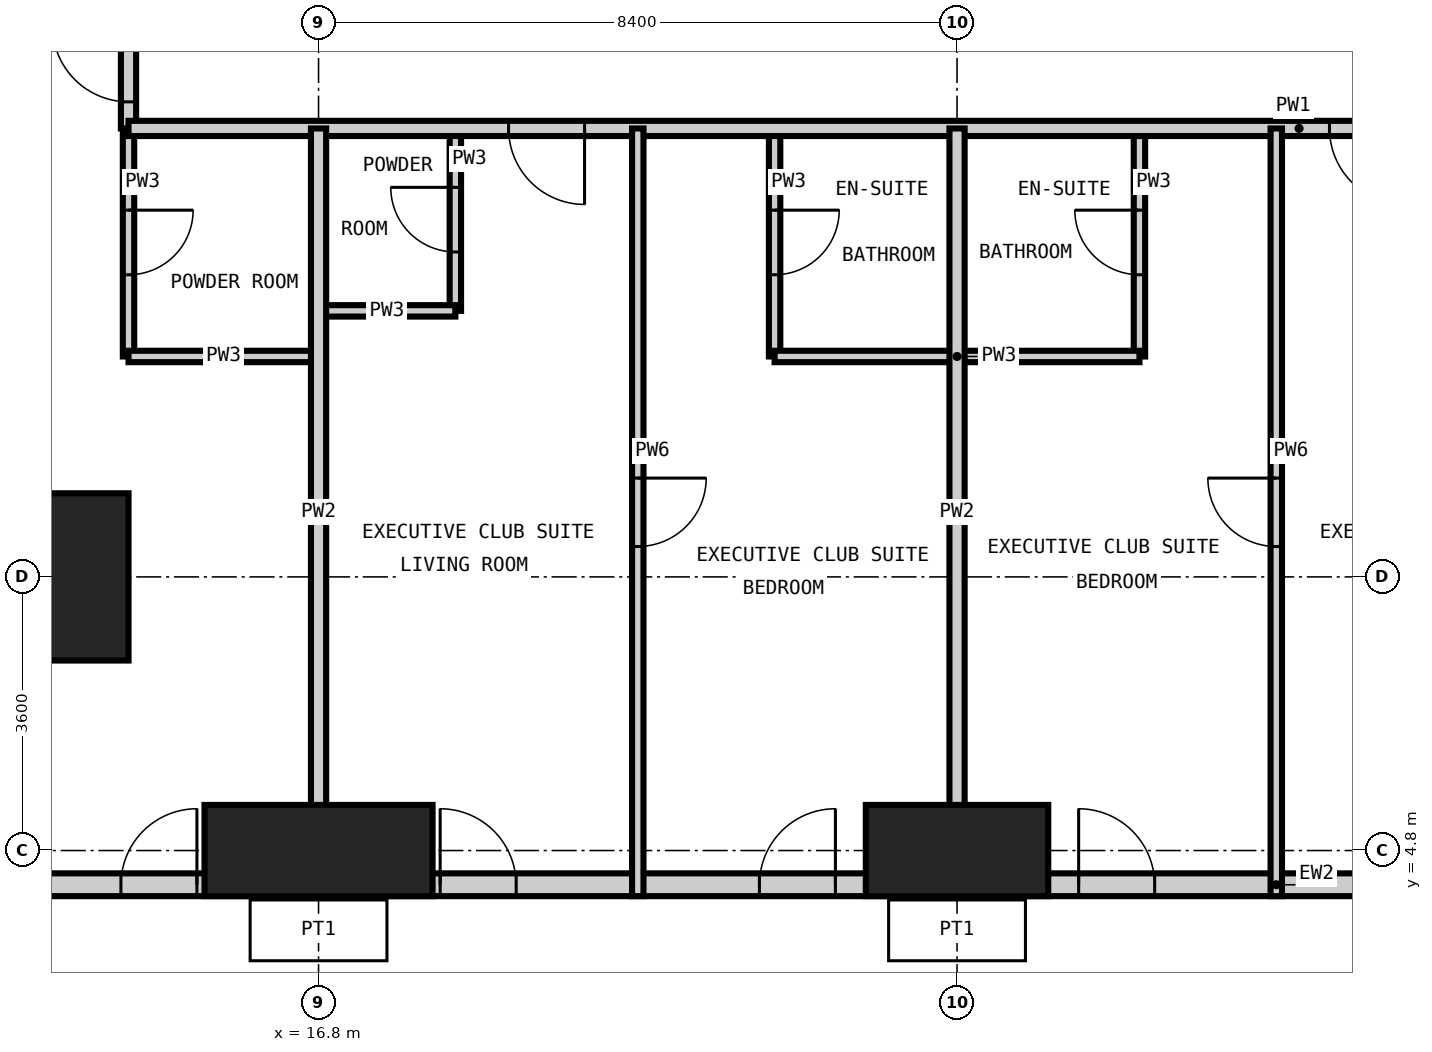
"""IFC4 building model, lengths in metres.
Left out: names, types, materials, properties, quantities, classifications, styles, units other than length and angle.
Written with IfcOpenShell. Run it as: python <this file> out.ifc"""

import sys

from ifc_helpers import new_model, si_unit, direction, frame, frame_2d, origin, origin_2d, place, context, subcontext, project, spatial, rectangle, extrude, element, fill, save


model = new_model("IFC4")
c1 = context("Model", 3, precision=1e-05, world=origin(), true_north=direction((0.0, 1.0)))
c2 = subcontext(c1, "Body", "Model", "MODEL_VIEW")
j1 = project(units=[si_unit("LENGTHUNIT", "METRE"), si_unit("PLANEANGLEUNIT", "RADIAN")], contexts=[c1])
p1 = place(None, origin())
s1 = spatial("IfcSite", under=j1, at=p1, CompositionType="ELEMENT")
p2 = place(p1, origin())
s2 = spatial("IfcBuilding", under=s1, at=p2, CompositionType="ELEMENT")
p3 = place(p2, frame((0.0, 0.0, 159.0)))
s3 = spatial("IfcBuildingStorey", under=s2, at=p3, CompositionType="ELEMENT", Elevation=159.0)
p4 = place(p3, frame((13.2, 8.4, -0.35), z_axis=(0.0, 0.0, 1.0), x_axis=(1.0, 0.0, 0.0)))
e1 = element("IfcColumn", 1, at=p4, inside=s3, PredefinedType="COLUMN", context=c2, shape_type="SweptSolid", body=[
    extrude(rectangle(XDim=2.2, YDim=2.2, at=origin_2d()), origin(), (0.0, 0.0, 1.0), 3.6),
])
p5 = place(p3, frame((16.8, 4.8, -0.35), z_axis=(0.0, 0.0, 1.0), x_axis=(1.0, 0.0, 0.0)))
e2 = element("IfcColumn", 2, at=p5, inside=s3, PredefinedType="COLUMN", context=c2, shape_type="SweptSolid", body=[
    extrude(rectangle(XDim=3.0, YDim=1.2, at=origin_2d()), origin(), (0.0, 0.0, 1.0), 3.6),
])
p6 = place(p3, frame((25.2, 4.8, -0.35), z_axis=(0.0, 0.0, 1.0), x_axis=(1.0, 0.0, 0.0)))
e3 = element("IfcColumn", 3, at=p6, inside=s3, PredefinedType="COLUMN", context=c2, shape_type="SweptSolid", body=[
    extrude(rectangle(XDim=2.4, YDim=1.2, at=origin_2d()), origin(), (0.0, 0.0, 1.0), 3.6),
])
p7 = place(p3, frame((6.9, 4.35, 0.0), z_axis=(0.0, 0.0, 1.0), x_axis=(1.0, 0.0, 0.0)))
e4 = element("IfcWall", 4, at=p7, inside=s3, PredefinedType="SOLIDWALL", context=c2, shape_type="SweptSolid", body=[
    extrude(rectangle(XDim=45.0, YDim=0.3, at=frame_2d((22.5, 0.0))), origin(), (0.0, 0.0, 1.0), 3.25),
])
p8 = place(p7, frame((2.75, 0.0, 0.0)))
e5 = element("IfcOpeningElement", 5, at=p8, cuts=e4, PredefinedType="OPENING", context=c2, shape_type="SweptSolid", body=[
    extrude(rectangle(XDim=1.0, YDim=2.4, at=frame_2d((0.5, 1.2))), frame((0.0, 0.16, 0.0), z_axis=(0.0, -1.0, 0.0), x_axis=(1.0, 0.0, 0.0)), (0.0, 0.0, 1.0), 0.32),
])
p9 = place(p7, frame((7.3, 0.0, 0.0)))
e6 = element("IfcOpeningElement", 6, at=p9, cuts=e4, PredefinedType="OPENING", context=c2, shape_type="SweptSolid", body=[
    extrude(rectangle(XDim=1.0, YDim=2.4, at=frame_2d((0.5, 1.2))), frame((0.0, 0.16, 0.0), z_axis=(0.0, -1.0, 0.0), x_axis=(1.0, 0.0, 0.0)), (0.0, 0.0, 1.0), 0.32),
])
p10 = place(p7, frame((11.5, 0.0, 0.0)))
e7 = element("IfcOpeningElement", 7, at=p10, cuts=e4, PredefinedType="OPENING", context=c2, shape_type="SweptSolid", body=[
    extrude(rectangle(XDim=1.0, YDim=2.4, at=frame_2d((0.5, 1.2))), frame((0.0, 0.16, 0.0), z_axis=(0.0, -1.0, 0.0), x_axis=(1.0, 0.0, 0.0)), (0.0, 0.0, 1.0), 0.32),
])
p11 = place(p7, frame((15.7, 0.0, 0.0)))
e8 = element("IfcOpeningElement", 8, at=p11, cuts=e4, PredefinedType="OPENING", context=c2, shape_type="SweptSolid", body=[
    extrude(rectangle(XDim=1.0, YDim=2.4, at=frame_2d((0.5, 1.2))), frame((0.0, 0.16, 0.0), z_axis=(0.0, -1.0, 0.0), x_axis=(1.0, 0.0, 0.0)), (0.0, 0.0, 1.0), 0.32),
])
p12 = place(p7, frame((19.9, 0.0, 0.0)))
e9 = element("IfcOpeningElement", 9, at=p12, cuts=e4, PredefinedType="OPENING", context=c2, shape_type="SweptSolid", body=[
    extrude(rectangle(XDim=1.0, YDim=2.4, at=frame_2d((0.5, 1.2))), frame((0.0, 0.16, 0.0), z_axis=(0.0, -1.0, 0.0), x_axis=(1.0, 0.0, 0.0)), (0.0, 0.0, 1.0), 0.32),
])
p13 = place(p7, frame((24.1, 0.0, 0.0)))
e10 = element("IfcOpeningElement", 10, at=p13, cuts=e4, PredefinedType="OPENING", context=c2, shape_type="SweptSolid", body=[
    extrude(rectangle(XDim=1.0, YDim=2.4, at=frame_2d((0.5, 1.2))), frame((0.0, 0.16, 0.0), z_axis=(0.0, -1.0, 0.0), x_axis=(1.0, 0.0, 0.0)), (0.0, 0.0, 1.0), 0.32),
])
p14 = place(p7, frame((28.3, 0.0, 0.0)))
e11 = element("IfcOpeningElement", 11, at=p14, cuts=e4, PredefinedType="OPENING", context=c2, shape_type="SweptSolid", body=[
    extrude(rectangle(XDim=1.0, YDim=2.4, at=frame_2d((0.5, 1.2))), frame((0.0, 0.16, 0.0), z_axis=(0.0, -1.0, 0.0), x_axis=(1.0, 0.0, 0.0)), (0.0, 0.0, 1.0), 0.32),
])
p15 = place(p7, frame((32.5, 0.0, 0.0)))
e12 = element("IfcOpeningElement", 12, at=p15, cuts=e4, PredefinedType="OPENING", context=c2, shape_type="SweptSolid", body=[
    extrude(rectangle(XDim=1.0, YDim=2.4, at=frame_2d((0.5, 1.2))), frame((0.0, 0.16, 0.0), z_axis=(0.0, -1.0, 0.0), x_axis=(1.0, 0.0, 0.0)), (0.0, 0.0, 1.0), 0.32),
])
p16 = place(p7, frame((36.7, 0.0, 0.0)))
e13 = element("IfcOpeningElement", 13, at=p16, cuts=e4, PredefinedType="OPENING", context=c2, shape_type="SweptSolid", body=[
    extrude(rectangle(XDim=1.0, YDim=2.4, at=frame_2d((0.5, 1.2))), frame((0.0, 0.16, 0.0), z_axis=(0.0, -1.0, 0.0), x_axis=(1.0, 0.0, 0.0)), (0.0, 0.0, 1.0), 0.32),
])
p17 = place(p7, frame((41.25, 0.0, 0.0)))
e14 = element("IfcOpeningElement", 14, at=p17, cuts=e4, PredefinedType="OPENING", context=c2, shape_type="SweptSolid", body=[
    extrude(rectangle(XDim=1.0, YDim=2.4, at=frame_2d((0.5, 1.2))), frame((0.0, 0.16, 0.0), z_axis=(0.0, -1.0, 0.0), x_axis=(1.0, 0.0, 0.0)), (0.0, 0.0, 1.0), 0.32),
])
p18 = place(p3, frame((14.3, 11.3, 0.0), z_axis=(0.0, 0.0, 1.0), x_axis=(0.0, 1.0, 0.0)))
e15 = element("IfcWall", 15, at=p18, inside=s3, PredefinedType="PARTITIONING", context=c2, shape_type="SweptSolid", body=[
    extrude(rectangle(XDim=3.0, YDim=0.15, at=frame_2d((1.5, 0.0))), origin(), (0.0, 0.0, 1.0), 3.25),
])
p19 = place(p18, frame((1.075, 0.0, 0.0)))
e16 = element("IfcOpeningElement", 16, at=p19, cuts=e15, PredefinedType="OPENING", context=c2, shape_type="SweptSolid", body=[
    extrude(rectangle(XDim=0.85, YDim=2.1, at=frame_2d((0.425, 1.05))), frame((0.0, 0.085, 0.0), z_axis=(0.0, -1.0, 0.0), x_axis=(1.0, 0.0, 0.0)), (0.0, 0.0, 1.0), 0.17),
])
p20 = place(p3, frame((18.6, 11.9, 0.0), z_axis=(0.0, 0.0, 1.0), x_axis=(0.0, 1.0, 0.0)))
e17 = element("IfcWall", 17, at=p20, inside=s3, PredefinedType="PARTITIONING", context=c2, shape_type="SweptSolid", body=[
    extrude(rectangle(XDim=2.4, YDim=0.15, at=frame_2d((1.2, 0.0))), origin(), (0.0, 0.0, 1.0), 3.25),
])
p21 = place(p20, frame((0.775, 0.0, 0.0)))
e18 = element("IfcOpeningElement", 18, at=p21, cuts=e17, PredefinedType="OPENING", context=c2, shape_type="SweptSolid", body=[
    extrude(rectangle(XDim=0.85, YDim=2.1, at=frame_2d((0.425, 1.05))), frame((0.0, 0.085, 0.0), z_axis=(0.0, -1.0, 0.0), x_axis=(1.0, 0.0, 0.0)), (0.0, 0.0, 1.0), 0.17),
])
p22 = place(p3, frame((22.8, 11.3, 0.0), z_axis=(0.0, 0.0, 1.0), x_axis=(0.0, 1.0, 0.0)))
e19 = element("IfcWall", 19, at=p22, inside=s3, PredefinedType="PARTITIONING", context=c2, shape_type="SweptSolid", body=[
    extrude(rectangle(XDim=3.0, YDim=0.15, at=frame_2d((1.5, 0.0))), origin(), (0.0, 0.0, 1.0), 3.25),
])
p23 = place(p22, frame((1.075, 0.0, 0.0)))
e20 = element("IfcOpeningElement", 20, at=p23, cuts=e19, PredefinedType="OPENING", context=c2, shape_type="SweptSolid", body=[
    extrude(rectangle(XDim=0.85, YDim=2.1, at=frame_2d((0.425, 1.05))), frame((0.0, 0.085, 0.0), z_axis=(0.0, -1.0, 0.0), x_axis=(1.0, 0.0, 0.0)), (0.0, 0.0, 1.0), 0.17),
])
p24 = place(p3, frame((27.6, 11.3, 0.0), z_axis=(0.0, 0.0, 1.0), x_axis=(0.0, 1.0, 0.0)))
e21 = element("IfcWall", 21, at=p24, inside=s3, PredefinedType="PARTITIONING", context=c2, shape_type="SweptSolid", body=[
    extrude(rectangle(XDim=3.0, YDim=0.15, at=frame_2d((1.5, 0.0))), origin(), (0.0, 0.0, 1.0), 3.25),
])
p25 = place(p24, frame((1.075, 0.0, 0.0)))
e22 = element("IfcOpeningElement", 22, at=p25, cuts=e21, PredefinedType="OPENING", context=c2, shape_type="SweptSolid", body=[
    extrude(rectangle(XDim=0.85, YDim=2.1, at=frame_2d((0.425, 1.05))), frame((0.0, 0.085, 0.0), z_axis=(0.0, -1.0, 0.0), x_axis=(1.0, 0.0, 0.0)), (0.0, 0.0, 1.0), 0.17),
])
p26 = place(p3, frame((14.3, 11.3, 0.0), z_axis=(0.0, 0.0, 1.0), x_axis=(1.0, 0.0, 0.0)))
e23 = element("IfcWall", 23, at=p26, inside=s3, PredefinedType="PARTITIONING", context=c2, shape_type="SweptSolid", body=[
    extrude(rectangle(XDim=2.5, YDim=0.15, at=frame_2d((1.25, 0.0))), origin(), (0.0, 0.0, 1.0), 3.25),
])
p27 = place(p3, frame((22.8, 11.3, 0.0), z_axis=(0.0, 0.0, 1.0), x_axis=(1.0, 0.0, 0.0)))
e24 = element("IfcWall", 24, at=p27, inside=s3, PredefinedType="PARTITIONING", context=c2, shape_type="SweptSolid", body=[
    extrude(rectangle(XDim=4.8, YDim=0.15, at=frame_2d((2.4, 0.0))), origin(), (0.0, 0.0, 1.0), 3.25),
])
p28 = place(p3, frame((16.8, 11.9, 0.0), z_axis=(0.0, 0.0, 1.0), x_axis=(1.0, 0.0, 0.0)))
e25 = element("IfcWall", 25, at=p28, inside=s3, PredefinedType="PARTITIONING", context=c2, shape_type="SweptSolid", body=[
    extrude(rectangle(XDim=1.8, YDim=0.15, at=frame_2d((0.9, 0.0))), origin(), (0.0, 0.0, 1.0), 3.25),
])
p29 = place(p3, frame((14.3, 14.3, 0.0), z_axis=(0.0, 0.0, 1.0), x_axis=(0.0, 1.0, 0.0)))
e26 = element("IfcWall", 26, at=p29, inside=s3, PredefinedType="PARTITIONING", context=c2, shape_type="SweptSolid", body=[
    extrude(rectangle(XDim=31.4, YDim=0.2, at=frame_2d((15.7, 0.0))), origin(), (0.0, 0.0, 1.0), 3.25),
])
p30 = place(p29, frame((8.3, 0.0, 0.0)))
e27 = element("IfcOpeningElement", 27, at=p30, cuts=e26, PredefinedType="OPENING", context=c2, shape_type="SweptSolid", body=[
    extrude(rectangle(XDim=1.0, YDim=2.2, at=frame_2d((0.5, 1.1))), frame((0.0, 0.11, 0.0), z_axis=(0.0, -1.0, 0.0), x_axis=(1.0, 0.0, 0.0)), (0.0, 0.0, 1.0), 0.22),
])
p31 = place(p29, frame((20.9, 0.0, 0.0)))
e28 = element("IfcOpeningElement", 28, at=p31, cuts=e26, PredefinedType="OPENING", context=c2, shape_type="SweptSolid", body=[
    extrude(rectangle(XDim=1.0, YDim=2.2, at=frame_2d((0.5, 1.1))), frame((0.0, 0.11, 0.0), z_axis=(0.0, -1.0, 0.0), x_axis=(1.0, 0.0, 0.0)), (0.0, 0.0, 1.0), 0.22),
])
p32 = place(p29, frame((0.35, 0.0, 0.0)))
e29 = element("IfcOpeningElement", 29, at=p32, cuts=e26, PredefinedType="OPENING", context=c2, shape_type="SweptSolid", body=[
    extrude(rectangle(XDim=1.0, YDim=2.2, at=frame_2d((0.5, 1.1))), frame((0.0, 0.11, 0.0), z_axis=(0.0, -1.0, 0.0), x_axis=(1.0, 0.0, 0.0)), (0.0, 0.0, 1.0), 0.22),
])
p33 = place(p29, frame((29.05, 0.0, 0.0)))
e30 = element("IfcOpeningElement", 30, at=p33, cuts=e26, PredefinedType="OPENING", context=c2, shape_type="SweptSolid", body=[
    extrude(rectangle(XDim=1.0, YDim=2.2, at=frame_2d((0.5, 1.1))), frame((0.0, 0.11, 0.0), z_axis=(0.0, -1.0, 0.0), x_axis=(1.0, 0.0, 0.0)), (0.0, 0.0, 1.0), 0.22),
])
p34 = place(p3, frame((45.1, 14.3, 0.0), z_axis=(0.0, 0.0, 1.0), x_axis=(-1.0, 0.0, 0.0)))
e31 = element("IfcWall", 31, at=p34, inside=s3, PredefinedType="PARTITIONING", context=c2, shape_type="SweptSolid", body=[
    extrude(rectangle(XDim=30.8, YDim=0.2, at=frame_2d((15.4, 0.0))), origin(), (0.0, 0.0, 1.0), 3.25),
])
p35 = place(p34, frame((24.8, 0.0, 0.0)))
e32 = element("IfcOpeningElement", 32, at=p35, cuts=e31, PredefinedType="OPENING", context=c2, shape_type="SweptSolid", body=[
    extrude(rectangle(XDim=1.0, YDim=2.2, at=frame_2d((0.5, 1.1))), frame((0.0, 0.11, 0.0), z_axis=(0.0, -1.0, 0.0), x_axis=(1.0, 0.0, 0.0)), (0.0, 0.0, 1.0), 0.22),
])
p36 = place(p34, frame((14.0, 0.0, 0.0)))
e33 = element("IfcOpeningElement", 33, at=p36, cuts=e31, PredefinedType="OPENING", context=c2, shape_type="SweptSolid", body=[
    extrude(rectangle(XDim=1.0, YDim=2.2, at=frame_2d((0.5, 1.1))), frame((0.0, 0.11, 0.0), z_axis=(0.0, -1.0, 0.0), x_axis=(1.0, 0.0, 0.0)), (0.0, 0.0, 1.0), 0.22),
])
p37 = place(p34, frame((8.0, 0.0, 0.0)))
e34 = element("IfcOpeningElement", 34, at=p37, cuts=e31, PredefinedType="OPENING", context=c2, shape_type="SweptSolid", body=[
    extrude(rectangle(XDim=1.0, YDim=2.2, at=frame_2d((0.5, 1.1))), frame((0.0, 0.11, 0.0), z_axis=(0.0, -1.0, 0.0), x_axis=(1.0, 0.0, 0.0)), (0.0, 0.0, 1.0), 0.22),
])
for number, where, z_axis, x_axis in (
    (35, (16.8, 4.2, 0.0), (0.0, 0.0, 1.0), (0.0, 1.0, 0.0)),
    (36, (25.2, 4.2, 0.0), (0.0, 0.0, 1.0), (0.0, 1.0, 0.0)),
):
    element("IfcWall", number, at=place(p3, frame(where, z_axis=z_axis, x_axis=x_axis)), inside=s3, PredefinedType="PARTITIONING", context=c2, shape_type="SweptSolid", body=[
        extrude(rectangle(XDim=10.1, YDim=0.2, at=frame_2d((5.05, 0.0))), origin(), (0.0, 0.0, 1.0), 3.25),
    ])
p38 = place(p3, frame((21.0, 4.2, 0.0), z_axis=(0.0, 0.0, 1.0), x_axis=(0.0, 1.0, 0.0)))
e37 = element("IfcWall", 37, at=p38, inside=s3, PredefinedType="PARTITIONING", context=c2, shape_type="SweptSolid", body=[
    extrude(rectangle(XDim=10.1, YDim=0.15, at=frame_2d((5.05, 0.0))), origin(), (0.0, 0.0, 1.0), 3.25),
])
p39 = place(p38, frame((4.6, 0.0, 0.0)))
e38 = element("IfcOpeningElement", 38, at=p39, cuts=e37, PredefinedType="OPENING", context=c2, shape_type="SweptSolid", body=[
    extrude(rectangle(XDim=0.9, YDim=2.1, at=frame_2d((0.45, 1.05))), frame((0.0, 0.085, 0.0), z_axis=(0.0, -1.0, 0.0), x_axis=(1.0, 0.0, 0.0)), (0.0, 0.0, 1.0), 0.17),
])
p40 = place(p3, frame((29.4, 4.2, 0.0), z_axis=(0.0, 0.0, 1.0), x_axis=(0.0, 1.0, 0.0)))
e39 = element("IfcWall", 39, at=p40, inside=s3, PredefinedType="PARTITIONING", context=c2, shape_type="SweptSolid", body=[
    extrude(rectangle(XDim=10.1, YDim=0.15, at=frame_2d((5.05, 0.0))), origin(), (0.0, 0.0, 1.0), 3.25),
])
p41 = place(p40, frame((4.6, 0.0, 0.0)))
e40 = element("IfcOpeningElement", 40, at=p41, cuts=e39, PredefinedType="OPENING", context=c2, shape_type="SweptSolid", body=[
    extrude(rectangle(XDim=0.9, YDim=2.1, at=frame_2d((0.45, 1.05))), frame((0.0, 0.085, 0.0), z_axis=(0.0, -1.0, 0.0), x_axis=(1.0, 0.0, 0.0)), (0.0, 0.0, 1.0), 0.17),
])
p42 = place(p9, origin())
e41 = element("IfcDoor", 41, at=p42, inside=s3, OperationType="SINGLE_SWING_RIGHT", PredefinedType="DOOR", context=c2, shape_type="SweptSolid", body=[
    extrude(rectangle(XDim=1.0, YDim=2.4, at=frame_2d((0.5, 1.2))), frame((0.0, 0.025, 0.0), z_axis=(0.0, -1.0, 0.0), x_axis=(1.0, 0.0, 0.0)), (0.0, 0.0, 1.0), 0.05),
])
fill(e6, e41)
p43 = place(p10, origin())
e42 = element("IfcDoor", 42, at=p43, inside=s3, OperationType="SINGLE_SWING_LEFT", PredefinedType="DOOR", context=c2, shape_type="SweptSolid", body=[
    extrude(rectangle(XDim=1.0, YDim=2.4, at=frame_2d((0.5, 1.2))), frame((0.0, 0.025, 0.0), z_axis=(0.0, -1.0, 0.0), x_axis=(1.0, 0.0, 0.0)), (0.0, 0.0, 1.0), 0.05),
])
fill(e7, e42)
p44 = place(p11, origin())
e43 = element("IfcDoor", 43, at=p44, inside=s3, OperationType="SINGLE_SWING_RIGHT", PredefinedType="DOOR", context=c2, shape_type="SweptSolid", body=[
    extrude(rectangle(XDim=1.0, YDim=2.4, at=frame_2d((0.5, 1.2))), frame((0.0, 0.025, 0.0), z_axis=(0.0, -1.0, 0.0), x_axis=(1.0, 0.0, 0.0)), (0.0, 0.0, 1.0), 0.05),
])
fill(e8, e43)
p45 = place(p12, origin())
e44 = element("IfcDoor", 44, at=p45, inside=s3, OperationType="SINGLE_SWING_LEFT", PredefinedType="DOOR", context=c2, shape_type="SweptSolid", body=[
    extrude(rectangle(XDim=1.0, YDim=2.4, at=frame_2d((0.5, 1.2))), frame((0.0, 0.025, 0.0), z_axis=(0.0, -1.0, 0.0), x_axis=(1.0, 0.0, 0.0)), (0.0, 0.0, 1.0), 0.05),
])
fill(e9, e44)
p46 = place(p35, origin())
e45 = element("IfcDoor", 45, at=p46, inside=s3, OperationType="SINGLE_SWING_LEFT", PredefinedType="DOOR", context=c2, shape_type="SweptSolid", body=[
    extrude(rectangle(XDim=1.0, YDim=2.2, at=frame_2d((0.5, 1.1))), frame((0.0, 0.025, 0.0), z_axis=(0.0, -1.0, 0.0), x_axis=(1.0, 0.0, 0.0)), (0.0, 0.0, 1.0), 0.05),
])
fill(e32, e45)
p47 = place(p21, origin())
e46 = element("IfcDoor", 46, at=p47, inside=s3, OperationType="SINGLE_SWING_RIGHT", PredefinedType="DOOR", context=c2, shape_type="SweptSolid", body=[
    extrude(rectangle(XDim=0.85, YDim=2.1, at=frame_2d((0.425, 1.05))), frame((0.0, 0.025, 0.0), z_axis=(0.0, -1.0, 0.0), x_axis=(1.0, 0.0, 0.0)), (0.0, 0.0, 1.0), 0.05),
])
fill(e18, e46)
p48 = place(p39, frame((0.9, 0.0, 0.0), z_axis=(0.0, 0.0, 1.0), x_axis=(-1.0, 0.0, 0.0)))
e47 = element("IfcDoor", 47, at=p48, inside=s3, OperationType="SINGLE_SWING_LEFT", PredefinedType="DOOR", context=c2, shape_type="SweptSolid", body=[
    extrude(rectangle(XDim=0.9, YDim=2.1, at=frame_2d((0.45, 1.05))), frame((0.0, 0.025, 0.0), z_axis=(0.0, -1.0, 0.0), x_axis=(1.0, 0.0, 0.0)), (0.0, 0.0, 1.0), 0.05),
])
fill(e38, e47)
p49 = place(p23, frame((0.85, 0.0, 0.0), z_axis=(0.0, 0.0, 1.0), x_axis=(-1.0, 0.0, 0.0)))
e48 = element("IfcDoor", 48, at=p49, inside=s3, OperationType="SINGLE_SWING_LEFT", PredefinedType="DOOR", context=c2, shape_type="SweptSolid", body=[
    extrude(rectangle(XDim=0.85, YDim=2.1, at=frame_2d((0.425, 1.05))), frame((0.0, 0.025, 0.0), z_axis=(0.0, -1.0, 0.0), x_axis=(1.0, 0.0, 0.0)), (0.0, 0.0, 1.0), 0.05),
])
fill(e20, e48)
p50 = place(p36, origin())
e49 = element("IfcDoor", 49, at=p50, inside=s3, OperationType="SINGLE_SWING_LEFT", PredefinedType="DOOR", context=c2, shape_type="SweptSolid", body=[
    extrude(rectangle(XDim=1.0, YDim=2.2, at=frame_2d((0.5, 1.1))), frame((0.0, 0.025, 0.0), z_axis=(0.0, -1.0, 0.0), x_axis=(1.0, 0.0, 0.0)), (0.0, 0.0, 1.0), 0.05),
])
fill(e33, e49)
p51 = place(p41, origin())
e50 = element("IfcDoor", 50, at=p51, inside=s3, OperationType="SINGLE_SWING_RIGHT", PredefinedType="DOOR", context=c2, shape_type="SweptSolid", body=[
    extrude(rectangle(XDim=0.9, YDim=2.1, at=frame_2d((0.45, 1.05))), frame((0.0, 0.025, 0.0), z_axis=(0.0, -1.0, 0.0), x_axis=(1.0, 0.0, 0.0)), (0.0, 0.0, 1.0), 0.05),
])
fill(e40, e50)
p52 = place(p25, origin())
e51 = element("IfcDoor", 51, at=p52, inside=s3, OperationType="SINGLE_SWING_RIGHT", PredefinedType="DOOR", context=c2, shape_type="SweptSolid", body=[
    extrude(rectangle(XDim=0.85, YDim=2.1, at=frame_2d((0.425, 1.05))), frame((0.0, 0.025, 0.0), z_axis=(0.0, -1.0, 0.0), x_axis=(1.0, 0.0, 0.0)), (0.0, 0.0, 1.0), 0.05),
])
fill(e22, e51)
p53 = place(p32, origin())
e52 = element("IfcDoor", 52, at=p53, inside=s3, OperationType="SINGLE_SWING_RIGHT", PredefinedType="DOOR", context=c2, shape_type="SweptSolid", body=[
    extrude(rectangle(XDim=1.0, YDim=2.2, at=frame_2d((0.5, 1.1))), frame((0.0, 0.025, 0.0), z_axis=(0.0, -1.0, 0.0), x_axis=(1.0, 0.0, 0.0)), (0.0, 0.0, 1.0), 0.05),
])
fill(e29, e52)
p54 = place(p19, frame((0.85, 0.0, 0.0), z_axis=(0.0, 0.0, 1.0), x_axis=(-1.0, 0.0, 0.0)))
e53 = element("IfcDoor", 53, at=p54, inside=s3, OperationType="SINGLE_SWING_LEFT", PredefinedType="DOOR", context=c2, shape_type="SweptSolid", body=[
    extrude(rectangle(XDim=0.85, YDim=2.1, at=frame_2d((0.425, 1.05))), frame((0.0, 0.025, 0.0), z_axis=(0.0, -1.0, 0.0), x_axis=(1.0, 0.0, 0.0)), (0.0, 0.0, 1.0), 0.05),
])
fill(e16, e53)
save(model, sys.argv[1])
